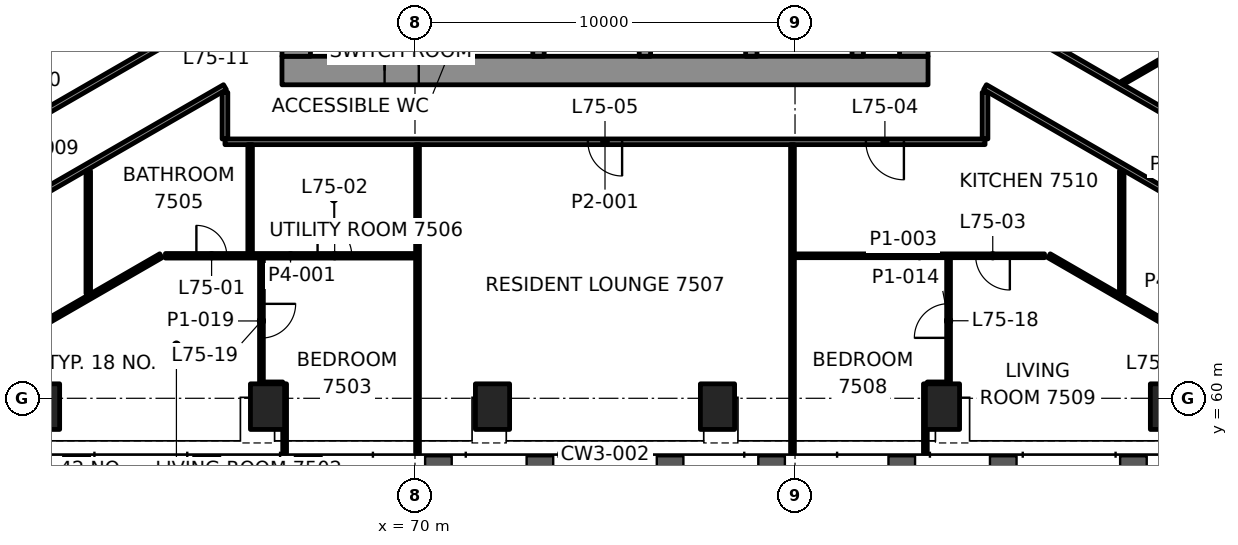
"""IFC4 building model, lengths in metres.
Left out: names, types, materials, properties, quantities, classifications, styles, units other than length and angle.
Written with IfcOpenShell. Run it as: python <this file> out.ifc"""

import sys

from ifc_helpers import new_model, si_unit, direction, frame, frame_2d, origin, origin_2d, place, context, subcontext, project, spatial, rectangle, hollow_rectangle, extrude, element, fill, save


model = new_model("IFC4")
c1 = context("Model", 3, precision=1e-05, world=origin(), true_north=direction((0.0, 1.0)))
c2 = subcontext(c1, "Body", "Model", "MODEL_VIEW")
j1 = project(units=[si_unit("LENGTHUNIT", "METRE"), si_unit("PLANEANGLEUNIT", "RADIAN")], contexts=[c1])
p1 = place(None, origin())
s1 = spatial("IfcSite", under=j1, at=p1, CompositionType="ELEMENT")
p2 = place(p1, origin())
s2 = spatial("IfcBuilding", under=s1, at=p2, CompositionType="ELEMENT")
p3 = place(p2, frame((0.0, 0.0, 309.1)))
s3 = spatial("IfcBuildingStorey", under=s2, at=p3, CompositionType="ELEMENT", Elevation=309.1)
for number, where, z_axis, x_axis in (
    (1, (60.2, 59.78, -0.0), (0.0, 0.0, 1.0), (1.0, 0.0, 0.0)),
    (2, (66.12, 59.78, -0.0), (0.0, 0.0, 1.0), (1.0, 0.0, 0.0)),
    (3, (72.04, 59.78, -0.0), (0.0, 0.0, 1.0), (1.0, 0.0, 0.0)),
    (4, (77.96, 59.78, -0.0), (0.0, 0.0, 1.0), (1.0, 0.0, 0.0)),
    (5, (83.88, 59.78, -0.0), (0.0, 0.0, 1.0), (1.0, 0.0, 0.0)),
    (6, (89.8, 59.78, -0.0), (0.0, 0.0, 1.0), (1.0, 0.0, 0.0)),
):
    element("IfcColumn", number, at=place(p3, frame(where, z_axis=z_axis, x_axis=x_axis)), inside=s3, PredefinedType="COLUMN", context=c2, shape_type="SweptSolid", body=[
        extrude(hollow_rectangle(XDim=0.9, YDim=1.2, WallThickness=0.06, at=origin_2d()), origin(), (0.0, 0.0, 1.0), 3.5),
    ])
p4 = place(p3, frame((66.5, 68.625, 0.0), z_axis=(0.0, 0.0, 1.0), x_axis=(1.0, 0.0, 0.0)))
e7 = element("IfcWall", 7, at=p4, inside=s3, PredefinedType="SHEAR", context=c2, shape_type="SweptSolid", body=[
    extrude(rectangle(XDim=17.0, YDim=0.75, at=frame_2d((8.5, 0.0))), origin(), (0.0, 0.0, 1.0), 3.3),
])
p5 = place(p4, frame((2.7, 0.0, 0.0)))
e8 = element("IfcOpeningElement", 8, at=p5, cuts=e7, PredefinedType="OPENING", context=c2, shape_type="SweptSolid", body=[
    extrude(rectangle(XDim=0.9, YDim=2.1, at=frame_2d((0.45, 1.05))), frame((0.0, 0.385, 0.0), z_axis=(0.0, -1.0, 0.0), x_axis=(1.0, 0.0, 0.0)), (0.0, 0.0, 1.0), 0.77),
])
p6 = place(p3, frame((66.875, 69.0, 0.0), z_axis=(0.0, 0.0, 1.0), x_axis=(0.0, 1.0, 0.0)))
e9 = element("IfcWall", 9, at=p6, inside=s3, PredefinedType="SHEAR", context=c2, shape_type="SweptSolid", body=[
    extrude(rectangle(XDim=12.0, YDim=0.75, at=frame_2d((6.0, 0.0))), origin(), (0.0, 0.0, 1.0), 3.3),
])
p7 = place(p6, frame((3.7, 0.0, 0.0)))
e10 = element("IfcOpeningElement", 10, at=p7, cuts=e9, PredefinedType="OPENING", context=c2, shape_type="SweptSolid", body=[
    extrude(rectangle(XDim=1.2, YDim=2.1, at=frame_2d((0.6, 1.05))), frame((0.0, 0.385, 0.0), z_axis=(0.0, -1.0, 0.0), x_axis=(1.0, 0.0, 0.0)), (0.0, 0.0, 1.0), 0.77),
])
p8 = place(p6, frame((0.925, 0.0, 0.0)))
e11 = element("IfcOpeningElement", 11, at=p8, cuts=e9, PredefinedType="OPENING", context=c2, shape_type="SweptSolid", body=[
    extrude(rectangle(XDim=0.9, YDim=2.1, at=frame_2d((0.45, 1.05))), frame((0.0, 0.385, 0.0), z_axis=(0.0, -1.0, 0.0), x_axis=(1.0, 0.0, 0.0)), (0.0, 0.0, 1.0), 0.77),
])
p9 = place(p3, frame((83.125, 69.0, 0.0), z_axis=(0.0, 0.0, 1.0), x_axis=(0.0, 1.0, 0.0)))
e12 = element("IfcWall", 12, at=p9, inside=s3, PredefinedType="SHEAR", context=c2, shape_type="SweptSolid", body=[
    extrude(rectangle(XDim=12.0, YDim=0.75, at=frame_2d((6.0, 0.0))), origin(), (0.0, 0.0, 1.0), 3.3),
])
p10 = place(p9, frame((3.4, 0.0, 0.0)))
e13 = element("IfcOpeningElement", 13, at=p10, cuts=e12, PredefinedType="OPENING", context=c2, shape_type="SweptSolid", body=[
    extrude(rectangle(XDim=1.8, YDim=2.1, at=frame_2d((0.9, 1.05))), frame((0.0, 0.385, 0.0), z_axis=(0.0, -1.0, 0.0), x_axis=(1.0, 0.0, 0.0)), (0.0, 0.0, 1.0), 0.77),
])
for number, where, z_axis, x_axis in (
    (14, (70.45, 69.0, 0.0), (0.0, 0.0, 1.0), (0.0, 1.0, 0.0)),
    (15, (73.25, 69.0, 0.0), (0.0, 0.0, 1.0), (0.0, 1.0, 0.0)),
    (16, (76.05, 69.0, 0.0), (0.0, 0.0, 1.0), (0.0, 1.0, 0.0)),
    (17, (78.85, 69.0, 0.0), (0.0, 0.0, 1.0), (0.0, 1.0, 0.0)),
    (18, (81.65, 69.0, 0.0), (0.0, 0.0, 1.0), (0.0, 1.0, 0.0)),
):
    element("IfcWall", number, at=place(p3, frame(where, z_axis=z_axis, x_axis=x_axis)), inside=s3, PredefinedType="SHEAR", context=c2, shape_type="SweptSolid", body=[
        extrude(rectangle(XDim=2.6, YDim=0.3, at=frame_2d((1.3, 0.0))), origin(), (0.0, 0.0, 1.0), 3.3),
    ])
p11 = place(p3, frame((66.02, 60.38, 0.0), z_axis=(0.0, 0.0, 1.0), x_axis=(1.0, 0.0, 0.0)))
e19 = element("IfcWall", 19, at=p11, inside=s3, PredefinedType="PARTITIONING", context=c2, shape_type="SweptSolid", body=[
    extrude(rectangle(XDim=0.5, YDim=0.1, at=frame_2d((0.25, 0.0))), origin(), (0.0, 0.0, 1.0), 2.7),
])
p12 = place(p3, frame((83.48, 60.38, 0.0), z_axis=(0.0, 0.0, 1.0), x_axis=(1.0, 0.0, 0.0)))
e20 = element("IfcWall", 20, at=p12, inside=s3, PredefinedType="PARTITIONING", context=c2, shape_type="SweptSolid", body=[
    extrude(rectangle(XDim=0.509, YDim=0.1, at=frame_2d((0.254, 0.0))), origin(), (0.0, 0.0, 1.0), 2.7),
])
p13 = place(p3, frame((63.434, 63.75, 0.0), z_axis=(0.0, 0.0, 1.0), x_axis=(1.0, 0.0, 0.0)))
e21 = element("IfcWall", 21, at=p13, inside=s3, PredefinedType="PARTITIONING", context=c2, shape_type="SweptSolid", body=[
    extrude(rectangle(XDim=6.582, YDim=0.12, at=frame_2d((3.291, 0.0))), origin(), (0.0, 0.0, 1.0), 2.7),
])
p14 = place(p13, frame((0.814, 0.0, 0.0)))
e22 = element("IfcOpeningElement", 22, at=p14, cuts=e21, PredefinedType="OPENING", context=c2, shape_type="SweptSolid", body=[
    extrude(rectangle(XDim=0.8, YDim=2.1, at=frame_2d((0.4, 1.05))), frame((0.0, 0.07, 0.0), z_axis=(0.0, -1.0, 0.0), x_axis=(1.0, 0.0, 0.0)), (0.0, 0.0, 1.0), 0.14),
])
p15 = place(p13, frame((4.002, 0.0, 0.0)))
e23 = element("IfcOpeningElement", 23, at=p15, cuts=e21, PredefinedType="OPENING", context=c2, shape_type="SweptSolid", body=[
    extrude(rectangle(XDim=0.9, YDim=2.1, at=frame_2d((0.45, 1.05))), frame((0.0, 0.07, 0.0), z_axis=(0.0, -1.0, 0.0), x_axis=(1.0, 0.0, 0.0)), (0.0, 0.0, 1.0), 0.14),
])
p16 = place(p3, frame((86.566, 63.75, 0.0), z_axis=(0.0, 0.0, 1.0), x_axis=(-1.0, 0.0, 0.0)))
e24 = element("IfcWall", 24, at=p16, inside=s3, PredefinedType="PARTITIONING", context=c2, shape_type="SweptSolid", body=[
    extrude(rectangle(XDim=6.582, YDim=0.1, at=frame_2d((3.291, 0.0))), origin(), (0.0, 0.0, 1.0), 2.7),
])
p17 = place(p16, frame((0.913, 0.0, 0.0)))
e25 = element("IfcOpeningElement", 25, at=p17, cuts=e24, PredefinedType="OPENING", context=c2, shape_type="SweptSolid", body=[
    extrude(rectangle(XDim=0.9, YDim=2.1, at=frame_2d((0.45, 1.05))), frame((0.0, 0.06, 0.0), z_axis=(0.0, -1.0, 0.0), x_axis=(1.0, 0.0, 0.0)), (0.0, 0.0, 1.0), 0.12),
])
p18 = place(p3, frame((85.0, 66.75, 0.0), z_axis=(0.0, 0.0, 1.0), x_axis=(-1.0, 0.0, 0.0)))
e26 = element("IfcWall", 26, at=p18, inside=s3, PredefinedType="PARTITIONING", context=c2, shape_type="SweptSolid", body=[
    extrude(rectangle(XDim=20.0, YDim=0.15, at=frame_2d((10.0, 0.0))), origin(), (0.0, 0.0, 1.0), 2.7),
])
p19 = place(p18, frame((2.135, 0.0, 0.0)))
e27 = element("IfcOpeningElement", 27, at=p19, cuts=e26, PredefinedType="OPENING", context=c2, shape_type="SweptSolid", body=[
    extrude(rectangle(XDim=1.0, YDim=2.1, at=frame_2d((0.5, 1.05))), frame((0.0, 0.085, 0.0), z_axis=(0.0, -1.0, 0.0), x_axis=(1.0, 0.0, 0.0)), (0.0, 0.0, 1.0), 0.17),
])
p20 = place(p18, frame((9.55, 0.0, 0.0)))
e28 = element("IfcOpeningElement", 28, at=p20, cuts=e26, PredefinedType="OPENING", context=c2, shape_type="SweptSolid", body=[
    extrude(rectangle(XDim=0.9, YDim=2.1, at=frame_2d((0.45, 1.05))), frame((0.0, 0.085, 0.0), z_axis=(0.0, -1.0, 0.0), x_axis=(1.0, 0.0, 0.0)), (0.0, 0.0, 1.0), 0.17),
])
p21 = place(p3, frame((88.611, 68.298, 0.0), z_axis=(0.0, 0.0, 1.0), x_axis=(0.866017435768, 0.500013800756, 0.0)))
e29 = element("IfcWall", 29, at=p21, inside=s3, PredefinedType="PARTITIONING", context=c2, shape_type="SweptSolid", body=[
    extrude(rectangle(XDim=8.003, YDim=0.1, at=frame_2d((4.001, 0.0))), origin(), (0.0, 0.0, 1.0), 2.688),
])
p22 = place(p3, frame((63.314, 63.75, 0.0), z_axis=(0.0, 0.0, 1.0), x_axis=(-0.866030084385, -0.499991892875, 0.0)))
e30 = element("IfcWall", 30, at=p22, inside=s3, PredefinedType="PARTITIONING", context=c2, shape_type="SweptSolid", body=[
    extrude(rectangle(XDim=10.38, YDim=0.12, at=frame_2d((5.19, 0.0))), origin(), (0.0, 0.0, 1.0), 2.7),
])
p23 = place(p22, frame((6.218, 0.0, 0.0)))
e31 = element("IfcOpeningElement", 31, at=p23, cuts=e30, PredefinedType="OPENING", context=c2, shape_type="SweptSolid", body=[
    extrude(rectangle(XDim=0.9, YDim=2.1, at=frame_2d((0.45, 1.05))), frame((0.0, 0.07, 0.0), z_axis=(0.0, -1.0, 0.0), x_axis=(1.0, 0.0, 0.0)), (0.0, 0.0, 1.0), 0.14),
])
p24 = place(p3, frame((65.0, 68.187, 0.0), z_axis=(0.0, 0.0, 1.0), x_axis=(-0.866028339337, -0.499994915439, 0.0)))
e32 = element("IfcWall", 32, at=p24, inside=s3, PredefinedType="PARTITIONING", context=c2, shape_type="SweptSolid", body=[
    extrude(rectangle(XDim=10.937, YDim=0.15, at=frame_2d((5.468, 0.0))), origin(), (0.0, 0.0, 1.0), 2.697),
])
p25 = place(p24, frame((6.943, 0.0, 0.0)))
e33 = element("IfcOpeningElement", 33, at=p25, cuts=e32, PredefinedType="OPENING", context=c2, shape_type="SweptSolid", body=[
    extrude(rectangle(XDim=1.0, YDim=2.1, at=frame_2d((0.5, 1.05))), frame((0.0, 0.085, 0.0), z_axis=(0.0, -1.0, 0.0), x_axis=(1.0, 0.0, 0.0)), (0.0, 0.0, 1.0), 0.17),
])
p26 = place(p3, frame((54.628, 64.278, 0.0), z_axis=(0.0, 0.0, 1.0), x_axis=(0.866033426221, 0.499986104476, 0.0)))
e34 = element("IfcWall", 34, at=p26, inside=s3, PredefinedType="PARTITIONING", context=c2, shape_type="SweptSolid", body=[
    extrude(rectangle(XDim=11.89, YDim=0.15, at=frame_2d((5.945, 0.0))), origin(), (0.0, 0.0, 1.0), 2.7),
])
p27 = place(p26, frame((10.612, 0.0, 0.0)))
e35 = element("IfcOpeningElement", 35, at=p27, cuts=e34, PredefinedType="OPENING", context=c2, shape_type="SweptSolid", body=[
    extrude(rectangle(XDim=1.0, YDim=2.1, at=frame_2d((0.5, 1.05))), frame((0.0, 0.085, 0.0), z_axis=(0.0, -1.0, 0.0), x_axis=(1.0, 0.0, 0.0)), (0.0, 0.0, 1.0), 0.17),
])
p28 = place(p3, frame((62.0, 71.998, 0.0), z_axis=(0.0, 0.0, 1.0), x_axis=(-0.866025574339, -0.499999704591, 0.0)))
e36 = element("IfcWall", 36, at=p28, inside=s3, PredefinedType="PARTITIONING", context=c2, shape_type="SweptSolid", body=[
    extrude(rectangle(XDim=13.365, YDim=0.12, at=frame_2d((6.682, 0.0))), origin(), (0.0, 0.0, 1.0), 2.7),
])
p29 = place(p28, frame((0.421, 0.0, 0.0)))
e37 = element("IfcOpeningElement", 37, at=p29, cuts=e36, PredefinedType="OPENING", context=c2, shape_type="SweptSolid", body=[
    extrude(rectangle(XDim=0.8, YDim=2.1, at=frame_2d((0.4, 1.05))), frame((0.0, 0.07, 0.0), z_axis=(0.0, -1.0, 0.0), x_axis=(1.0, 0.0, 0.0)), (0.0, 0.0, 1.0), 0.14),
])
p30 = place(p28, frame((10.158, 0.0, 0.0)))
e38 = element("IfcOpeningElement", 38, at=p30, cuts=e36, PredefinedType="OPENING", context=c2, shape_type="SweptSolid", body=[
    extrude(rectangle(XDim=0.8, YDim=2.1, at=frame_2d((0.4, 1.05))), frame((0.0, 0.07, 0.0), z_axis=(0.0, -1.0, 0.0), x_axis=(1.0, 0.0, 0.0)), (0.0, 0.0, 1.0), 0.14),
])
p31 = place(p3, frame((88.597, 62.756, 0.0), z_axis=(0.0, 0.0, 1.0), x_axis=(0.0, 1.0, 0.0)))
e39 = element("IfcWall", 39, at=p31, inside=s3, PredefinedType="PARTITIONING", context=c2, shape_type="SweptSolid", body=[
    extrude(rectangle(XDim=3.228, YDim=0.12, at=frame_2d((1.614, 0.0))), origin(), (0.0, 0.0, 1.0), 2.697),
])
p32 = place(p3, frame((85.0, 66.825, 0.0), z_axis=(0.0, 0.0, 1.0), x_axis=(0.0, 1.0, 0.0)))
e40 = element("IfcWall", 40, at=p32, inside=s3, PredefinedType="PARTITIONING", context=c2, shape_type="SweptSolid", body=[
    extrude(rectangle(XDim=1.226, YDim=0.15, at=frame_2d((0.613, 0.0))), origin(), (0.0, 0.0, 1.0), 2.697),
])
p33 = place(p3, frame((84.04, 60.381, 0.0), z_axis=(0.0, 0.0, 1.0), x_axis=(0.0, 1.0, 0.0)))
e41 = element("IfcWall", 41, at=p33, inside=s3, PredefinedType="PARTITIONING", context=c2, shape_type="SweptSolid", body=[
    extrude(rectangle(XDim=3.319, YDim=0.1, at=frame_2d((1.66, 0.0))), origin(), (0.0, 0.0, 1.0), 2.7),
])
p34 = place(p33, frame((1.209, 0.0, 0.0)))
e42 = element("IfcOpeningElement", 42, at=p34, cuts=e41, PredefinedType="OPENING", context=c2, shape_type="SweptSolid", body=[
    extrude(rectangle(XDim=0.9, YDim=2.1, at=frame_2d((0.45, 1.05))), frame((0.0, 0.06, 0.0), z_axis=(0.0, -1.0, 0.0), x_axis=(1.0, 0.0, 0.0)), (0.0, 0.0, 1.0), 0.12),
])
p35 = place(p3, frame((83.43, 58.56, 0.0), z_axis=(0.0, 0.0, 1.0), x_axis=(0.0, 1.0, 0.0)))
e43 = element("IfcWall", 43, at=p35, inside=s3, PredefinedType="PARTITIONING", context=c2, shape_type="SweptSolid", body=[
    extrude(rectangle(XDim=1.82, YDim=0.1, at=frame_2d((0.91, 0.0))), origin(), (0.0, 0.0, 1.0), 2.688),
])
for number, where, z_axis, x_axis in (
    (44, (79.933, 58.56, 0.0), (0.0, 0.0, 1.0), (0.0, 1.0, 0.0)),
    (45, (70.067, 58.56, 0.0), (0.0, 0.0, 1.0), (0.0, 1.0, 0.0)),
):
    element("IfcWall", number, at=place(p3, frame(where, z_axis=z_axis, x_axis=x_axis)), inside=s3, PredefinedType="PARTITIONING", context=c2, shape_type="SweptSolid", body=[
        extrude(rectangle(XDim=8.115, YDim=0.1, at=frame_2d((4.057, 0.0))), origin(), (0.0, 0.0, 1.0), 2.688),
    ])
p36 = place(p3, frame((66.57, 58.56, 0.0), z_axis=(0.0, 0.0, 1.0), x_axis=(0.0, 1.0, 0.0)))
e46 = element("IfcWall", 46, at=p36, inside=s3, PredefinedType="PARTITIONING", context=c2, shape_type="SweptSolid", body=[
    extrude(rectangle(XDim=1.82, YDim=0.1, at=frame_2d((0.91, 0.0))), origin(), (0.0, 0.0, 1.0), 2.688),
])
p37 = place(p3, frame((65.96, 63.69, 0.0), z_axis=(0.0, 0.0, 1.0), x_axis=(0.0, -1.0, 0.0)))
e47 = element("IfcWall", 47, at=p37, inside=s3, PredefinedType="PARTITIONING", context=c2, shape_type="SweptSolid", body=[
    extrude(rectangle(XDim=3.31, YDim=0.1, at=frame_2d((1.655, 0.0))), origin(), (0.0, 0.0, 1.0), 2.7),
])
p38 = place(p37, frame((1.205, 0.0, 0.0)))
e48 = element("IfcOpeningElement", 48, at=p38, cuts=e47, PredefinedType="OPENING", context=c2, shape_type="SweptSolid", body=[
    extrude(rectangle(XDim=0.9, YDim=2.1, at=frame_2d((0.45, 1.05))), frame((0.0, 0.06, 0.0), z_axis=(0.0, -1.0, 0.0), x_axis=(1.0, 0.0, 0.0)), (0.0, 0.0, 1.0), 0.12),
])
p39 = place(p3, frame((65.662, 63.81, 0.0), z_axis=(0.0, 0.0, 1.0), x_axis=(0.0, 1.0, 0.0)))
e49 = element("IfcWall", 49, at=p39, inside=s3, PredefinedType="PARTITIONING", context=c2, shape_type="SweptSolid", body=[
    extrude(rectangle(XDim=2.865, YDim=0.12, at=frame_2d((1.433, 0.0))), origin(), (0.0, 0.0, 1.0), 2.7),
])
p40 = place(p3, frame((65.0, 66.825, 0.0), z_axis=(0.0, 0.0, 1.0), x_axis=(0.0, 1.0, 0.0)))
e50 = element("IfcWall", 50, at=p40, inside=s3, PredefinedType="PARTITIONING", context=c2, shape_type="SweptSolid", body=[
    extrude(rectangle(XDim=1.226, YDim=0.15, at=frame_2d((0.613, 0.0))), origin(), (0.0, 0.0, 1.0), 2.697),
])
p41 = place(p3, frame((61.403, 62.756, 0.0), z_axis=(0.0, 0.0, 1.0), x_axis=(0.0, 1.0, 0.0)))
e51 = element("IfcWall", 51, at=p41, inside=s3, PredefinedType="PARTITIONING", context=c2, shape_type="SweptSolid", body=[
    extrude(rectangle(XDim=3.228, YDim=0.12, at=frame_2d((1.614, 0.0))), origin(), (0.0, 0.0, 1.0), 2.697),
])
p42 = place(p3, frame((85.075, 70.222, 0.0), z_axis=(0.0, 0.0, 1.0), x_axis=(0.866032051089, -0.499988486354, 0.0)))
e52 = element("IfcWall", 52, at=p42, inside=s3, PredefinedType="PARTITIONING", context=c2, shape_type="SweptSolid", body=[
    extrude(rectangle(XDim=11.889, YDim=0.15, at=frame_2d((5.945, 0.0))), origin(), (0.0, 0.0, 1.0), 2.7),
])
p43 = place(p42, frame((7.326, 0.0, 0.0)))
e53 = element("IfcOpeningElement", 53, at=p43, cuts=e52, PredefinedType="OPENING", context=c2, shape_type="SweptSolid", body=[
    extrude(rectangle(XDim=1.0, YDim=2.1, at=frame_2d((0.5, 1.05))), frame((0.0, 0.085, 0.0), z_axis=(0.0, -1.0, 0.0), x_axis=(1.0, 0.0, 0.0)), (0.0, 0.0, 1.0), 0.17),
])
p44 = place(p3, frame((94.472, 62.719, 0.0), z_axis=(0.0, 0.0, 1.0), x_axis=(-0.866029834468, 0.499992325753, 0.0)))
e54 = element("IfcWall", 54, at=p44, inside=s3, PredefinedType="PARTITIONING", context=c2, shape_type="SweptSolid", body=[
    extrude(rectangle(XDim=10.937, YDim=0.15, at=frame_2d((5.469, 0.0))), origin(), (0.0, 0.0, 1.0), 2.697),
])
p45 = place(p3, frame((86.686, 63.75, 0.0), z_axis=(0.0, 0.0, 1.0), x_axis=(0.866030084385, -0.499991892875, 0.0)))
e55 = element("IfcWall", 55, at=p45, inside=s3, PredefinedType="PARTITIONING", context=c2, shape_type="SweptSolid", body=[
    extrude(rectangle(XDim=10.38, YDim=0.12, at=frame_2d((5.19, 0.0))), origin(), (0.0, 0.0, 1.0), 2.7),
])
p46 = place(p45, frame((3.534, 0.0, 0.0)))
e56 = element("IfcOpeningElement", 56, at=p46, cuts=e55, PredefinedType="OPENING", context=c2, shape_type="SweptSolid", body=[
    extrude(rectangle(XDim=0.8, YDim=2.1, at=frame_2d((0.4, 1.05))), frame((0.0, 0.07, 0.0), z_axis=(0.0, -1.0, 0.0), x_axis=(1.0, 0.0, 0.0)), (0.0, 0.0, 1.0), 0.14),
])
p47 = place(p45, frame((5.135, 0.0, 0.0)))
e57 = element("IfcOpeningElement", 57, at=p47, cuts=e55, PredefinedType="OPENING", context=c2, shape_type="SweptSolid", body=[
    extrude(rectangle(XDim=0.9, YDim=2.1, at=frame_2d((0.45, 1.05))), frame((0.0, 0.07, 0.0), z_axis=(0.0, -1.0, 0.0), x_axis=(1.0, 0.0, 0.0)), (0.0, 0.0, 1.0), 0.14),
])
p48 = place(p3, frame((68.85, 69.0, 0.0), z_axis=(0.0, 0.0, 1.0), x_axis=(0.0, 1.0, 0.0)))
e58 = element("IfcWall", 58, at=p48, inside=s3, PredefinedType="PARTITIONING", context=c2, shape_type="SweptSolid", body=[
    extrude(rectangle(XDim=2.65, YDim=0.2, at=frame_2d((1.325, 0.0))), origin(), (0.0, 0.0, 1.0), 3.3),
])
p49 = place(p14, origin())
e59 = element("IfcDoor", 59, at=p49, inside=s3, OperationType="SINGLE_SWING_RIGHT", PredefinedType="DOOR", context=c2, shape_type="SweptSolid", body=[
    extrude(rectangle(XDim=0.8, YDim=2.1, at=frame_2d((0.4, 1.05))), frame((0.0, 0.025, 0.0), z_axis=(0.0, -1.0, 0.0), x_axis=(1.0, 0.0, 0.0)), (0.0, 0.0, 1.0), 0.05),
])
fill(e22, e59)
p50 = place(p15, origin())
e60 = element("IfcDoor", 60, at=p50, inside=s3, OperationType="SINGLE_SWING_LEFT", PredefinedType="DOOR", context=c2, shape_type="SweptSolid", body=[
    extrude(rectangle(XDim=0.9, YDim=2.1, at=frame_2d((0.45, 1.05))), frame((0.0, 0.025, 0.0), z_axis=(0.0, -1.0, 0.0), x_axis=(1.0, 0.0, 0.0)), (0.0, 0.0, 1.0), 0.05),
])
fill(e23, e60)
p51 = place(p17, origin())
e61 = element("IfcDoor", 61, at=p51, inside=s3, OperationType="SINGLE_SWING_RIGHT", PredefinedType="DOOR", context=c2, shape_type="SweptSolid", body=[
    extrude(rectangle(XDim=0.9, YDim=2.1, at=frame_2d((0.45, 1.05))), frame((0.0, 0.025, 0.0), z_axis=(0.0, -1.0, 0.0), x_axis=(1.0, 0.0, 0.0)), (0.0, 0.0, 1.0), 0.05),
])
fill(e25, e61)
p52 = place(p19, origin())
e62 = element("IfcDoor", 62, at=p52, inside=s3, OperationType="SINGLE_SWING_LEFT", PredefinedType="DOOR", context=c2, shape_type="SweptSolid", body=[
    extrude(rectangle(XDim=1.0, YDim=2.1, at=frame_2d((0.5, 1.05))), frame((0.0, 0.025, 0.0), z_axis=(0.0, -1.0, 0.0), x_axis=(1.0, 0.0, 0.0)), (0.0, 0.0, 1.0), 0.05),
])
fill(e27, e62)
p53 = place(p20, origin())
e63 = element("IfcDoor", 63, at=p53, inside=s3, OperationType="SINGLE_SWING_LEFT", PredefinedType="DOOR", context=c2, shape_type="SweptSolid", body=[
    extrude(rectangle(XDim=0.9, YDim=2.1, at=frame_2d((0.45, 1.05))), frame((0.0, 0.025, 0.0), z_axis=(0.0, -1.0, 0.0), x_axis=(1.0, 0.0, 0.0)), (0.0, 0.0, 1.0), 0.05),
])
fill(e28, e63)
p54 = place(p34, origin())
e64 = element("IfcDoor", 64, at=p54, inside=s3, OperationType="SINGLE_SWING_LEFT", PredefinedType="DOOR", context=c2, shape_type="SweptSolid", body=[
    extrude(rectangle(XDim=0.9, YDim=2.1, at=frame_2d((0.45, 1.05))), frame((0.0, 0.025, 0.0), z_axis=(0.0, -1.0, 0.0), x_axis=(1.0, 0.0, 0.0)), (0.0, 0.0, 1.0), 0.05),
])
fill(e42, e64)
p55 = place(p38, origin())
e65 = element("IfcDoor", 65, at=p55, inside=s3, OperationType="SINGLE_SWING_RIGHT", PredefinedType="DOOR", context=c2, shape_type="SweptSolid", body=[
    extrude(rectangle(XDim=0.9, YDim=2.1, at=frame_2d((0.45, 1.05))), frame((0.0, 0.025, 0.0), z_axis=(0.0, -1.0, 0.0), x_axis=(1.0, 0.0, 0.0)), (0.0, 0.0, 1.0), 0.05),
])
fill(e48, e65)
p56 = place(p5, origin())
e66 = element("IfcDoor", 66, at=p56, inside=s3, OperationType="SINGLE_SWING_LEFT", PredefinedType="DOOR", context=c2, shape_type="SweptSolid", body=[
    extrude(rectangle(XDim=0.9, YDim=2.1, at=frame_2d((0.45, 1.05))), frame((0.0, 0.095, 0.0), z_axis=(0.0, -1.0, 0.0), x_axis=(1.0, 0.0, 0.0)), (0.0, 0.0, 1.0), 0.19),
])
fill(e8, e66)
save(model, sys.argv[1])
